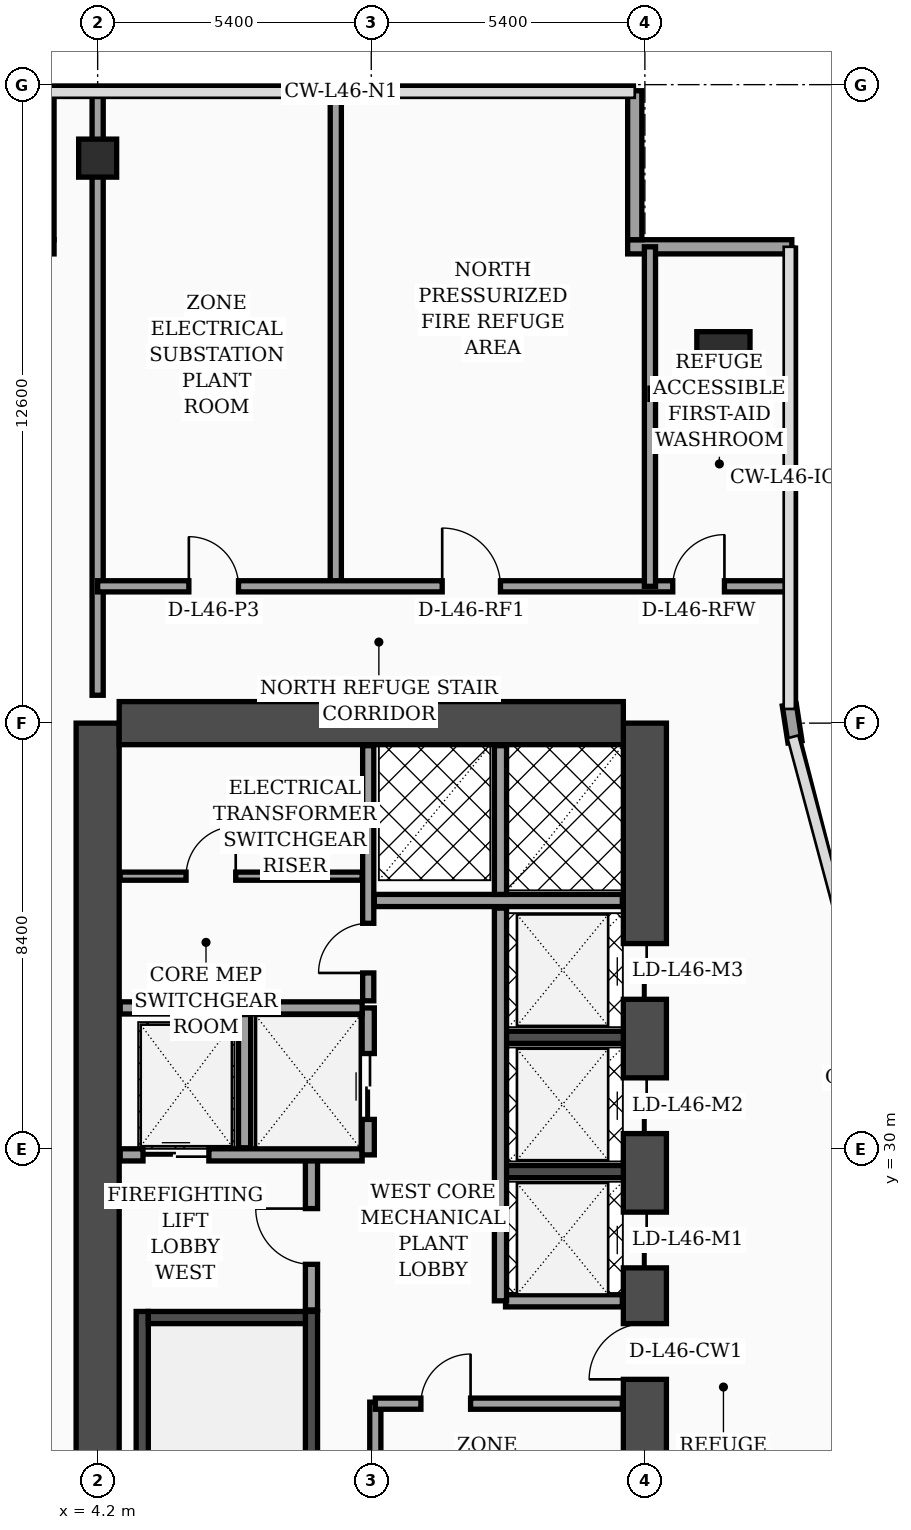
"""IFC4 building model, lengths in metres.
Left out: names, types, materials, properties, quantities, classifications, styles, units other than length and angle.
Written with IfcOpenShell. Run it as: python <this file> out.ifc"""

import sys

from ifc_helpers import new_model, si_unit, direction, frame, frame_2d, origin, origin_2d, place, context, subcontext, project, spatial, rectangle, hollow_rectangle, extrude, element, fill, save


model = new_model("IFC4")
c1 = context("Model", 3, precision=1e-05, world=origin(), true_north=direction((0.0, 1.0)))
c2 = subcontext(c1, "Body", "Model", "MODEL_VIEW")
j1 = project(units=[si_unit("LENGTHUNIT", "METRE"), si_unit("PLANEANGLEUNIT", "RADIAN")], contexts=[c1])
p1 = place(None, origin())
s1 = spatial("IfcSite", under=j1, at=p1, CompositionType="ELEMENT")
p2 = place(p1, origin())
s2 = spatial("IfcBuilding", under=s1, at=p2, CompositionType="ELEMENT")
p3 = place(p2, frame((0.0, 0.0, 186.5)))
s3 = spatial("IfcBuildingStorey", under=s2, at=p3, CompositionType="ELEMENT", Elevation=186.5)
p4 = place(p3, frame((4.2, 16.8, 0.0), z_axis=(0.0, 0.0, 1.0), x_axis=(0.0, 1.0, 0.0)))
e1 = element("IfcWall", 1, at=p4, inside=s3, PredefinedType="SHEAR", context=c2, shape_type="SweptSolid", body=[
    extrude(rectangle(XDim=21.6, YDim=0.85, at=frame_2d((10.8, 0.0))), origin(), (0.0, 0.0, 1.0), 4.35),
])
p5 = place(p3, frame((15.0, 16.8, 0.0), z_axis=(0.0, 0.0, 1.0), x_axis=(0.0, 1.0, 0.0)))
e2 = element("IfcWall", 2, at=p5, inside=s3, PredefinedType="SHEAR", context=c2, shape_type="SweptSolid", body=[
    extrude(rectangle(XDim=21.6, YDim=0.85, at=frame_2d((10.8, 0.0))), origin(), (0.0, 0.0, 1.0), 4.35),
])
p6 = place(p5, frame((8.65, 0.0, 0.0)))
e3 = element("IfcOpeningElement", 3, at=p6, cuts=e2, PredefinedType="OPENING", context=c2, shape_type="SweptSolid", body=[
    extrude(rectangle(XDim=1.1, YDim=2.2, at=frame_2d((0.55, 1.1))), frame((0.0, 0.435, 0.0), z_axis=(0.0, -1.0, 0.0), x_axis=(1.0, 0.0, 0.0)), (0.0, 0.0, 1.0), 0.87),
])
p7 = place(p5, frame((10.85, 0.0, 0.0)))
e4 = element("IfcOpeningElement", 4, at=p7, cuts=e2, PredefinedType="OPENING", context=c2, shape_type="SweptSolid", body=[
    extrude(rectangle(XDim=1.1, YDim=2.2, at=frame_2d((0.55, 1.1))), frame((0.0, 0.435, 0.0), z_axis=(0.0, -1.0, 0.0), x_axis=(1.0, 0.0, 0.0)), (0.0, 0.0, 1.0), 0.87),
])
p8 = place(p5, frame((13.5, 0.0, 0.0)))
e5 = element("IfcOpeningElement", 5, at=p8, cuts=e2, PredefinedType="OPENING", context=c2, shape_type="SweptSolid", body=[
    extrude(rectangle(XDim=1.1, YDim=2.2, at=frame_2d((0.55, 1.1))), frame((0.0, 0.435, 0.0), z_axis=(0.0, -1.0, 0.0), x_axis=(1.0, 0.0, 0.0)), (0.0, 0.0, 1.0), 0.87),
])
p9 = place(p5, frame((16.15, 0.0, 0.0)))
e6 = element("IfcOpeningElement", 6, at=p9, cuts=e2, PredefinedType="OPENING", context=c2, shape_type="SweptSolid", body=[
    extrude(rectangle(XDim=1.1, YDim=2.2, at=frame_2d((0.55, 1.1))), frame((0.0, 0.435, 0.0), z_axis=(0.0, -1.0, 0.0), x_axis=(1.0, 0.0, 0.0)), (0.0, 0.0, 1.0), 0.87),
])
p10 = place(p3, frame((4.625, 38.4, 0.0), z_axis=(0.0, 0.0, 1.0), x_axis=(1.0, 0.0, 0.0)))
e7 = element("IfcWall", 7, at=p10, inside=s3, PredefinedType="SHEAR", context=c2, shape_type="SweptSolid", body=[
    extrude(rectangle(XDim=9.95, YDim=0.85, at=frame_2d((4.975, 0.0))), origin(), (0.0, 0.0, 1.0), 4.35),
])
p11 = place(p3, frame((5.08, 17.225, 0.0), z_axis=(0.0, 0.0, 1.0), x_axis=(0.0, 1.0, 0.0)))
e8 = element("IfcWall", 8, at=p11, inside=s3, PredefinedType="SOLIDWALL", context=c2, shape_type="SweptSolid", body=[
    extrude(rectangle(XDim=9.565, YDim=0.24, at=frame_2d((4.782, 0.0))), origin(), (0.0, 0.0, 1.0), 4.35),
])
p12 = place(p3, frame((8.42, 17.225, 0.0), z_axis=(0.0, 0.0, 1.0), x_axis=(0.0, 1.0, 0.0)))
e9 = element("IfcWall", 9, at=p12, inside=s3, PredefinedType="SOLIDWALL", context=c2, shape_type="SweptSolid", body=[
    extrude(rectangle(XDim=9.565, YDim=0.24, at=frame_2d((4.782, 0.0))), origin(), (0.0, 0.0, 1.0), 4.35),
])
p13 = place(p12, frame((0.35, 0.0, 0.0)))
e10 = element("IfcOpeningElement", 10, at=p13, cuts=e9, PredefinedType="OPENING", context=c2, shape_type="SweptSolid", body=[
    extrude(rectangle(XDim=1.15, YDim=2.2, at=frame_2d((0.575, 1.1))), frame((0.0, 0.13, 0.0), z_axis=(0.0, -1.0, 0.0), x_axis=(1.0, 0.0, 0.0)), (0.0, 0.0, 1.0), 0.26),
])
p14 = place(p3, frame((5.2, 26.67, 0.0), z_axis=(0.0, 0.0, 1.0), x_axis=(1.0, 0.0, 0.0)))
e11 = element("IfcWall", 11, at=p14, inside=s3, PredefinedType="SOLIDWALL", context=c2, shape_type="SweptSolid", body=[
    extrude(rectangle(XDim=3.1, YDim=0.24, at=frame_2d((1.55, 0.0))), origin(), (0.0, 0.0, 1.0), 4.35),
])
for number, where, z_axis, x_axis in (
    (12, (12.18, 29.55, 0.0), (0.0, 0.0, 1.0), (1.0, 0.0, 0.0)),
    (13, (12.18, 32.2, 0.0), (0.0, 0.0, 1.0), (1.0, 0.0, 0.0)),
):
    element("IfcWall", number, at=place(p3, frame(where, z_axis=z_axis, x_axis=x_axis)), inside=s3, PredefinedType="SOLIDWALL", context=c2, shape_type="SweptSolid", body=[
        extrude(rectangle(XDim=2.395, YDim=0.24, at=frame_2d((1.198, 0.0))), origin(), (0.0, 0.0, 1.0), 4.35),
    ])
p15 = place(p3, frame((4.2, 49.55, 0.0), z_axis=(0.0, 0.0, 1.0), x_axis=(1.0, 0.0, 0.0)))
e14 = element("IfcColumn", 14, at=p15, inside=s3, PredefinedType="COLUMN", context=c2, shape_type="SweptSolid", body=[
    extrude(hollow_rectangle(XDim=0.75, YDim=0.75, WallThickness=0.032, at=origin_2d()), origin(), (0.0, 0.0, 1.0), 4.35),
])
p16 = place(p3, frame((16.55, 45.6, 0.0), z_axis=(0.0, 0.0, 1.0), x_axis=(1.0, 0.0, 0.0)))
e15 = element("IfcColumn", 15, at=p16, inside=s3, PredefinedType="COLUMN", context=c2, shape_type="SweptSolid", body=[
    extrude(rectangle(XDim=1.05, YDim=1.05, at=origin_2d()), origin(), (0.0, 0.0, 1.0), 4.35),
])
p17 = place(p3, frame((17.962, 38.03, 0.0), z_axis=(0.0, 0.0, 1.0), x_axis=(-0.15141125477, 0.988470855377, 0.0)))
e16 = element("IfcWall", 16, at=p17, inside=s3, PredefinedType="SOLIDWALL", context=c2, shape_type="SweptSolid", body=[
    extrude(rectangle(XDim=0.739, YDim=0.28, at=frame_2d((0.369, 0.0))), origin(), (0.0, 0.0, 1.0), 4.35),
])
p18 = place(p3, frame((17.9, 47.8, 0.0), z_axis=(0.0, 0.0, 1.0), x_axis=(-1.0, 0.0, 0.0)))
e17 = element("IfcWall", 17, at=p18, inside=s3, PredefinedType="SOLIDWALL", context=c2, shape_type="SweptSolid", body=[
    extrude(rectangle(XDim=3.24, YDim=0.28, at=frame_2d((1.62, 0.0))), origin(), (0.0, 0.0, 1.0), 4.35),
])
p19 = place(p3, frame((14.8, 47.94, 0.0), z_axis=(0.0, 0.0, 1.0), x_axis=(0.0, 1.0, 0.0)))
e18 = element("IfcWall", 18, at=p19, inside=s3, PredefinedType="SOLIDWALL", context=c2, shape_type="SweptSolid", body=[
    extrude(rectangle(XDim=2.94, YDim=0.28, at=frame_2d((1.47, 0.0))), origin(), (0.0, 0.0, 1.0), 4.35),
])
p20 = place(p3, frame((3.2, 50.88, 0.0), z_axis=(0.0, 0.0, 1.0), x_axis=(0.0, -1.0, 0.0)))
e19 = element("IfcWall", 19, at=p20, inside=s3, PredefinedType="SOLIDWALL", context=c2, shape_type="SweptSolid", body=[
    extrude(rectangle(XDim=2.94, YDim=0.28, at=frame_2d((1.47, 0.0))), origin(), (0.0, 0.0, 1.0), 3.85),
])
p21 = place(p3, frame((3.34, 47.8, 0.0), z_axis=(0.0, 0.0, 1.0), x_axis=(-1.0, 0.0, 0.0)))
e20 = element("IfcWall", 20, at=p21, inside=s3, PredefinedType="SOLIDWALL", context=c2, shape_type="SweptSolid", body=[
    extrude(rectangle(XDim=3.22, YDim=0.28, at=frame_2d((1.61, 0.0))), origin(), (0.0, 0.0, 1.0), 3.85),
])
p22 = place(p3, frame((8.42, 26.82, 0.0), z_axis=(0.0, 0.0, 1.0), x_axis=(0.0, 1.0, 0.0)))
e21 = element("IfcWall", 21, at=p22, inside=s3, PredefinedType="SOLIDWALL", context=c2, shape_type="SweptSolid", body=[
    extrude(rectangle(XDim=3.0, YDim=0.24, at=frame_2d((1.5, 0.0))), origin(), (0.0, 0.0, 1.0), 4.35),
])
p23 = place(p22, frame((0.9, 0.0, 0.0)))
e22 = element("IfcOpeningElement", 22, at=p23, cuts=e21, PredefinedType="OPENING", context=c2, shape_type="SweptSolid", body=[
    extrude(rectangle(XDim=1.1, YDim=2.2, at=frame_2d((0.55, 1.1))), frame((0.0, 0.13, 0.0), z_axis=(0.0, -1.0, 0.0), x_axis=(1.0, 0.0, 0.0)), (0.0, 0.0, 1.0), 0.26),
])
p24 = place(p3, frame((4.645, 29.88, 0.0), z_axis=(0.0, 0.0, 1.0), x_axis=(1.0, 0.0, 0.0)))
e23 = element("IfcWall", 23, at=p24, inside=s3, PredefinedType="SOLIDWALL", context=c2, shape_type="SweptSolid", body=[
    extrude(rectangle(XDim=4.775, YDim=0.24, at=frame_2d((2.387, 0.0))), origin(), (0.0, 0.0, 1.0), 4.35),
])
p25 = place(p24, frame((0.45, 0.0, 0.0)))
e24 = element("IfcOpeningElement", 24, at=p25, cuts=e23, PredefinedType="OPENING", context=c2, shape_type="SweptSolid", body=[
    extrude(rectangle(XDim=1.3, YDim=2.35, at=frame_2d((0.65, 1.175))), frame((0.0, 0.13, 0.0), z_axis=(0.0, -1.0, 0.0), x_axis=(1.0, 0.0, 0.0)), (0.0, 0.0, 1.0), 0.26),
])
p26 = place(p3, frame((7.1, 30.02, 0.0), z_axis=(0.0, 0.0, 1.0), x_axis=(0.0, 1.0, 0.0)))
e25 = element("IfcWall", 25, at=p26, inside=s3, PredefinedType="SOLIDWALL", context=c2, shape_type="SweptSolid", body=[
    extrude(rectangle(XDim=2.63, YDim=0.24, at=frame_2d((1.315, 0.0))), origin(), (0.0, 0.0, 1.0), 4.35),
])
p27 = place(p3, frame((9.54, 29.88, 0.0), z_axis=(0.0, 0.0, 1.0), x_axis=(0.0, 1.0, 0.0)))
e26 = element("IfcWall", 26, at=p27, inside=s3, PredefinedType="SOLIDWALL", context=c2, shape_type="SweptSolid", body=[
    extrude(rectangle(XDim=2.9, YDim=0.24, at=frame_2d((1.45, 0.0))), origin(), (0.0, 0.0, 1.0), 4.35),
])
p28 = place(p27, frame((0.7, 0.0, 0.0)))
e27 = element("IfcOpeningElement", 27, at=p28, cuts=e26, PredefinedType="OPENING", context=c2, shape_type="SweptSolid", body=[
    extrude(rectangle(XDim=1.3, YDim=2.35, at=frame_2d((0.65, 1.175))), frame((0.0, 0.13, 0.0), z_axis=(0.0, -1.0, 0.0), x_axis=(1.0, 0.0, 0.0)), (0.0, 0.0, 1.0), 0.26),
])
p29 = place(p3, frame((4.645, 32.78, 0.0), z_axis=(0.0, 0.0, 1.0), x_axis=(1.0, 0.0, 0.0)))
e28 = element("IfcWall", 28, at=p29, inside=s3, PredefinedType="SOLIDWALL", context=c2, shape_type="SweptSolid", body=[
    extrude(rectangle(XDim=4.775, YDim=0.24, at=frame_2d((2.387, 0.0))), origin(), (0.0, 0.0, 1.0), 4.0),
])
p30 = place(p3, frame((9.68, 17.245, 0.0), z_axis=(0.0, 0.0, 1.0), x_axis=(0.0, 1.0, 0.0)))
e29 = element("IfcWall", 29, at=p30, inside=s3, PredefinedType="SOLIDWALL", context=c2, shape_type="SweptSolid", body=[
    extrude(rectangle(XDim=7.755, YDim=0.22, at=frame_2d((3.877, 0.0))), origin(), (0.0, 0.0, 1.0), 4.35),
])
p31 = place(p3, frame((4.645, 35.38, 0.0), z_axis=(0.0, 0.0, 1.0), x_axis=(1.0, 0.0, 0.0)))
e30 = element("IfcWall", 30, at=p31, inside=s3, PredefinedType="PARTITIONING", context=c2, shape_type="SweptSolid", body=[
    extrude(rectangle(XDim=4.775, YDim=0.16, at=frame_2d((2.387, 0.0))), origin(), (0.0, 0.0, 1.0), 4.35),
])
p32 = place(p31, frame((1.3, 0.0, 0.0)))
e31 = element("IfcOpeningElement", 31, at=p32, cuts=e30, PredefinedType="OPENING", context=c2, shape_type="SweptSolid", body=[
    extrude(rectangle(XDim=0.98, YDim=2.15, at=frame_2d((0.49, 1.075))), frame((0.0, 0.09, 0.0), z_axis=(0.0, -1.0, 0.0), x_axis=(1.0, 0.0, 0.0)), (0.0, 0.0, 1.0), 0.18),
])
p33 = place(p3, frame((9.54, 32.92, 0.0), z_axis=(0.0, 0.0, 1.0), x_axis=(0.0, 1.0, 0.0)))
e32 = element("IfcWall", 32, at=p33, inside=s3, PredefinedType="SOLIDWALL", context=c2, shape_type="SweptSolid", body=[
    extrude(rectangle(XDim=5.035, YDim=0.22, at=frame_2d((2.518, 0.0))), origin(), (0.0, 0.0, 1.0), 4.35),
])
p34 = place(p33, frame((0.55, 0.0, 0.0)))
e33 = element("IfcOpeningElement", 33, at=p34, cuts=e32, PredefinedType="OPENING", context=c2, shape_type="SweptSolid", body=[
    extrude(rectangle(XDim=0.98, YDim=2.15, at=frame_2d((0.49, 1.075))), frame((0.0, 0.12, 0.0), z_axis=(0.0, -1.0, 0.0), x_axis=(1.0, 0.0, 0.0)), (0.0, 0.0, 1.0), 0.24),
])
p35 = place(p3, frame((9.68, 24.97, 0.0), z_axis=(0.0, 0.0, 1.0), x_axis=(1.0, 0.0, 0.0)))
e34 = element("IfcWall", 34, at=p35, inside=s3, PredefinedType="SOLIDWALL", context=c2, shape_type="SweptSolid", body=[
    extrude(rectangle(XDim=4.875, YDim=0.22, at=frame_2d((2.438, 0.0))), origin(), (0.0, 0.0, 1.0), 3.75),
])
p36 = place(p35, frame((0.9, 0.0, 0.0)))
e35 = element("IfcOpeningElement", 35, at=p36, cuts=e34, PredefinedType="OPENING", context=c2, shape_type="SweptSolid", body=[
    extrude(rectangle(XDim=0.98, YDim=2.15, at=frame_2d((0.49, 1.075))), frame((0.0, 0.12, 0.0), z_axis=(0.0, -1.0, 0.0), x_axis=(1.0, 0.0, 0.0)), (0.0, 0.0, 1.0), 0.24),
])
p37 = place(p3, frame((12.25, 27.0, 0.0), z_axis=(0.0, 0.0, 1.0), x_axis=(1.0, 0.0, 0.0)))
e36 = element("IfcWall", 36, at=p37, inside=s3, PredefinedType="SOLIDWALL", context=c2, shape_type="SweptSolid", body=[
    extrude(rectangle(XDim=2.305, YDim=0.24, at=frame_2d((1.152, 0.0))), origin(), (0.0, 0.0, 1.0), 4.35),
])
p38 = place(p3, frame((12.15, 27.0, 0.0), z_axis=(0.0, 0.0, 1.0), x_axis=(0.0, 1.0, 0.0)))
e37 = element("IfcWall", 37, at=p38, inside=s3, PredefinedType="SOLIDWALL", context=c2, shape_type="SweptSolid", body=[
    extrude(rectangle(XDim=7.75, YDim=0.24, at=frame_2d((3.875, 0.0))), origin(), (0.0, 0.0, 1.0), 4.35),
])
p39 = place(p3, frame((9.66, 34.9, 0.0), z_axis=(0.0, 0.0, 1.0), x_axis=(1.0, 0.0, 0.0)))
e38 = element("IfcWall", 38, at=p39, inside=s3, PredefinedType="SOLIDWALL", context=c2, shape_type="SweptSolid", body=[
    extrude(rectangle(XDim=4.895, YDim=0.24, at=frame_2d((2.448, 0.0))), origin(), (0.0, 0.0, 1.0), 4.35),
])
p40 = place(p3, frame((12.15, 35.02, 0.0), z_axis=(0.0, 0.0, 1.0), x_axis=(0.0, 1.0, 0.0)))
e39 = element("IfcWall", 39, at=p40, inside=s3, PredefinedType="SOLIDWALL", context=c2, shape_type="SweptSolid", body=[
    extrude(rectangle(XDim=2.935, YDim=0.24, at=frame_2d((1.468, 0.0))), origin(), (0.0, 0.0, 1.0), 4.35),
])
p41 = place(p3, frame((4.2, 38.95, 0.0), z_axis=(0.0, 0.0, 1.0), x_axis=(0.0, 1.0, 0.0)))
e40 = element("IfcWall", 40, at=p41, inside=s3, PredefinedType="SOLIDWALL", context=c2, shape_type="SweptSolid", body=[
    extrude(rectangle(XDim=11.99, YDim=0.22, at=frame_2d((5.995, 0.0))), origin(), (0.0, 0.0, 1.0), 3.75),
])
p42 = place(p3, frame((8.9, 41.1, 0.0), z_axis=(0.0, 0.0, 1.0), x_axis=(0.0, 1.0, 0.0)))
e41 = element("IfcWall", 41, at=p42, inside=s3, PredefinedType="SOLIDWALL", context=c2, shape_type="SweptSolid", body=[
    extrude(rectangle(XDim=9.84, YDim=0.22, at=frame_2d((4.92, 0.0))), origin(), (0.0, 0.0, 1.0), 3.85),
])
p43 = place(p3, frame((4.2, 41.1, 0.0), z_axis=(0.0, 0.0, 1.0), x_axis=(1.0, 0.0, 0.0)))
e42 = element("IfcWall", 42, at=p43, inside=s3, PredefinedType="SOLIDWALL", context=c2, shape_type="SweptSolid", body=[
    extrude(rectangle(XDim=13.65, YDim=0.22, at=frame_2d((6.825, 0.0))), origin(), (0.0, 0.0, 1.0), 3.75),
])
p44 = place(p43, frame((1.8, 0.0, 0.0)))
e43 = element("IfcOpeningElement", 43, at=p44, cuts=e42, PredefinedType="OPENING", context=c2, shape_type="SweptSolid", body=[
    extrude(rectangle(XDim=0.98, YDim=2.15, at=frame_2d((0.49, 1.075))), frame((0.0, 0.12, 0.0), z_axis=(0.0, -1.0, 0.0), x_axis=(1.0, 0.0, 0.0)), (0.0, 0.0, 1.0), 0.24),
])
p45 = place(p43, frame((6.8, 0.0, 0.0)))
e44 = element("IfcOpeningElement", 44, at=p45, cuts=e42, PredefinedType="OPENING", context=c2, shape_type="SweptSolid", body=[
    extrude(rectangle(XDim=1.15, YDim=2.2, at=frame_2d((0.575, 1.1))), frame((0.0, 0.12, 0.0), z_axis=(0.0, -1.0, 0.0), x_axis=(1.0, 0.0, 0.0)), (0.0, 0.0, 1.0), 0.24),
])
p46 = place(p43, frame((11.35, 0.0, 0.0)))
e45 = element("IfcOpeningElement", 45, at=p46, cuts=e42, PredefinedType="OPENING", context=c2, shape_type="SweptSolid", body=[
    extrude(rectangle(XDim=1.02, YDim=2.2, at=frame_2d((0.51, 1.1))), frame((0.0, 0.12, 0.0), z_axis=(0.0, -1.0, 0.0), x_axis=(1.0, 0.0, 0.0)), (0.0, 0.0, 1.0), 0.24),
])
p47 = place(p3, frame((15.1, 41.1, 0.0), z_axis=(0.0, 0.0, 1.0), x_axis=(0.0, 1.0, 0.0)))
e46 = element("IfcWall", 46, at=p47, inside=s3, PredefinedType="SOLIDWALL", context=c2, shape_type="SweptSolid", body=[
    extrude(rectangle(XDim=6.7, YDim=0.22, at=frame_2d((3.35, 0.0))), origin(), (0.0, 0.0, 1.0), 3.75),
])
p48 = place(p3, frame((15.1, 44.9, 0.0), z_axis=(0.0, 0.0, 1.0), x_axis=(1.0, 0.0, 0.0)))
e47 = element("IfcWall", 47, at=p48, inside=s3, PredefinedType="SOLIDWALL", context=c2, shape_type="SweptSolid", body=[
    extrude(rectangle(XDim=2.75, YDim=0.22, at=frame_2d((1.375, 0.0))), origin(), (0.0, 0.0, 1.0), 3.75),
])
p49 = place(p23, origin())
e48 = element("IfcDoor", 48, at=p49, inside=s3, OperationType="SINGLE_SWING_RIGHT", PredefinedType="DOOR", context=c2, shape_type="SweptSolid", body=[
    extrude(rectangle(XDim=1.1, YDim=2.2, at=frame_2d((0.55, 1.1))), frame((0.0, 0.025, 0.0), z_axis=(0.0, -1.0, 0.0), x_axis=(1.0, 0.0, 0.0)), (0.0, 0.0, 1.0), 0.05),
])
fill(e22, e48)
p50 = place(p25, origin())
e49 = element("IfcDoor", 49, at=p50, inside=s3, OperationType="DOUBLE_DOOR_SLIDING", PredefinedType="DOOR", context=c2, shape_type="SweptSolid", body=[
    extrude(rectangle(XDim=1.3, YDim=2.35, at=frame_2d((0.65, 1.175))), frame((0.0, 0.025, 0.0), z_axis=(0.0, -1.0, 0.0), x_axis=(1.0, 0.0, 0.0)), (0.0, 0.0, 1.0), 0.05),
])
fill(e24, e49)
p51 = place(p28, origin())
e50 = element("IfcDoor", 50, at=p51, inside=s3, OperationType="DOUBLE_DOOR_SLIDING", PredefinedType="DOOR", context=c2, shape_type="SweptSolid", body=[
    extrude(rectangle(XDim=1.3, YDim=2.35, at=frame_2d((0.65, 1.175))), frame((0.0, 0.025, 0.0), z_axis=(0.0, -1.0, 0.0), x_axis=(1.0, 0.0, 0.0)), (0.0, 0.0, 1.0), 0.05),
])
fill(e27, e50)
p52 = place(p32, origin())
e51 = element("IfcDoor", 51, at=p52, inside=s3, OperationType="SINGLE_SWING_RIGHT", PredefinedType="DOOR", context=c2, shape_type="SweptSolid", body=[
    extrude(rectangle(XDim=0.98, YDim=2.15, at=frame_2d((0.49, 1.075))), frame((0.0, 0.025, 0.0), z_axis=(0.0, -1.0, 0.0), x_axis=(1.0, 0.0, 0.0)), (0.0, 0.0, 1.0), 0.05),
])
fill(e31, e51)
p53 = place(p34, origin())
e52 = element("IfcDoor", 52, at=p53, inside=s3, OperationType="SINGLE_SWING_LEFT", PredefinedType="DOOR", context=c2, shape_type="SweptSolid", body=[
    extrude(rectangle(XDim=0.98, YDim=2.15, at=frame_2d((0.49, 1.075))), frame((0.0, 0.025, 0.0), z_axis=(0.0, -1.0, 0.0), x_axis=(1.0, 0.0, 0.0)), (0.0, 0.0, 1.0), 0.05),
])
fill(e33, e52)
p54 = place(p36, origin())
e53 = element("IfcDoor", 53, at=p54, inside=s3, OperationType="SINGLE_SWING_RIGHT", PredefinedType="DOOR", context=c2, shape_type="SweptSolid", body=[
    extrude(rectangle(XDim=0.98, YDim=2.15, at=frame_2d((0.49, 1.075))), frame((0.0, 0.025, 0.0), z_axis=(0.0, -1.0, 0.0), x_axis=(1.0, 0.0, 0.0)), (0.0, 0.0, 1.0), 0.05),
])
fill(e35, e53)
p55 = place(p44, origin())
e54 = element("IfcDoor", 54, at=p55, inside=s3, OperationType="SINGLE_SWING_LEFT", PredefinedType="DOOR", context=c2, shape_type="SweptSolid", body=[
    extrude(rectangle(XDim=0.98, YDim=2.15, at=frame_2d((0.49, 1.075))), frame((0.0, 0.025, 0.0), z_axis=(0.0, -1.0, 0.0), x_axis=(1.0, 0.0, 0.0)), (0.0, 0.0, 1.0), 0.05),
])
fill(e43, e54)
p56 = place(p45, origin())
e55 = element("IfcDoor", 55, at=p56, inside=s3, OperationType="SINGLE_SWING_LEFT", PredefinedType="DOOR", context=c2, shape_type="SweptSolid", body=[
    extrude(rectangle(XDim=1.15, YDim=2.2, at=frame_2d((0.575, 1.1))), frame((0.0, 0.025, 0.0), z_axis=(0.0, -1.0, 0.0), x_axis=(1.0, 0.0, 0.0)), (0.0, 0.0, 1.0), 0.05),
])
fill(e44, e55)
p57 = place(p46, origin())
e56 = element("IfcDoor", 56, at=p57, inside=s3, OperationType="SINGLE_SWING_RIGHT", PredefinedType="DOOR", context=c2, shape_type="SweptSolid", body=[
    extrude(rectangle(XDim=1.02, YDim=2.2, at=frame_2d((0.51, 1.1))), frame((0.0, 0.025, 0.0), z_axis=(0.0, -1.0, 0.0), x_axis=(1.0, 0.0, 0.0)), (0.0, 0.0, 1.0), 0.05),
])
fill(e45, e56)
p58 = place(p6, origin())
e57 = element("IfcDoor", 57, at=p58, inside=s3, OperationType="SINGLE_SWING_LEFT", PredefinedType="DOOR", context=c2, shape_type="SweptSolid", body=[
    extrude(rectangle(XDim=1.1, YDim=2.2, at=frame_2d((0.55, 1.1))), frame((0.0, 0.025, 0.0), z_axis=(0.0, -1.0, 0.0), x_axis=(1.0, 0.0, 0.0)), (0.0, 0.0, 1.0), 0.05),
])
fill(e3, e57)
p59 = place(p7, origin())
e58 = element("IfcDoor", 58, at=p59, inside=s3, OperationType="DOUBLE_DOOR_SLIDING", PredefinedType="DOOR", context=c2, shape_type="SweptSolid", body=[
    extrude(rectangle(XDim=1.1, YDim=2.2, at=frame_2d((0.55, 1.1))), frame((0.0, 0.025, 0.0), z_axis=(0.0, -1.0, 0.0), x_axis=(1.0, 0.0, 0.0)), (0.0, 0.0, 1.0), 0.05),
])
fill(e4, e58)
p60 = place(p8, origin())
e59 = element("IfcDoor", 59, at=p60, inside=s3, OperationType="DOUBLE_DOOR_SLIDING", PredefinedType="DOOR", context=c2, shape_type="SweptSolid", body=[
    extrude(rectangle(XDim=1.1, YDim=2.2, at=frame_2d((0.55, 1.1))), frame((0.0, 0.025, 0.0), z_axis=(0.0, -1.0, 0.0), x_axis=(1.0, 0.0, 0.0)), (0.0, 0.0, 1.0), 0.05),
])
fill(e5, e59)
p61 = place(p9, origin())
e60 = element("IfcDoor", 60, at=p61, inside=s3, OperationType="DOUBLE_DOOR_SLIDING", PredefinedType="DOOR", context=c2, shape_type="SweptSolid", body=[
    extrude(rectangle(XDim=1.1, YDim=2.2, at=frame_2d((0.55, 1.1))), frame((0.0, 0.025, 0.0), z_axis=(0.0, -1.0, 0.0), x_axis=(1.0, 0.0, 0.0)), (0.0, 0.0, 1.0), 0.05),
])
fill(e6, e60)
save(model, sys.argv[1])
